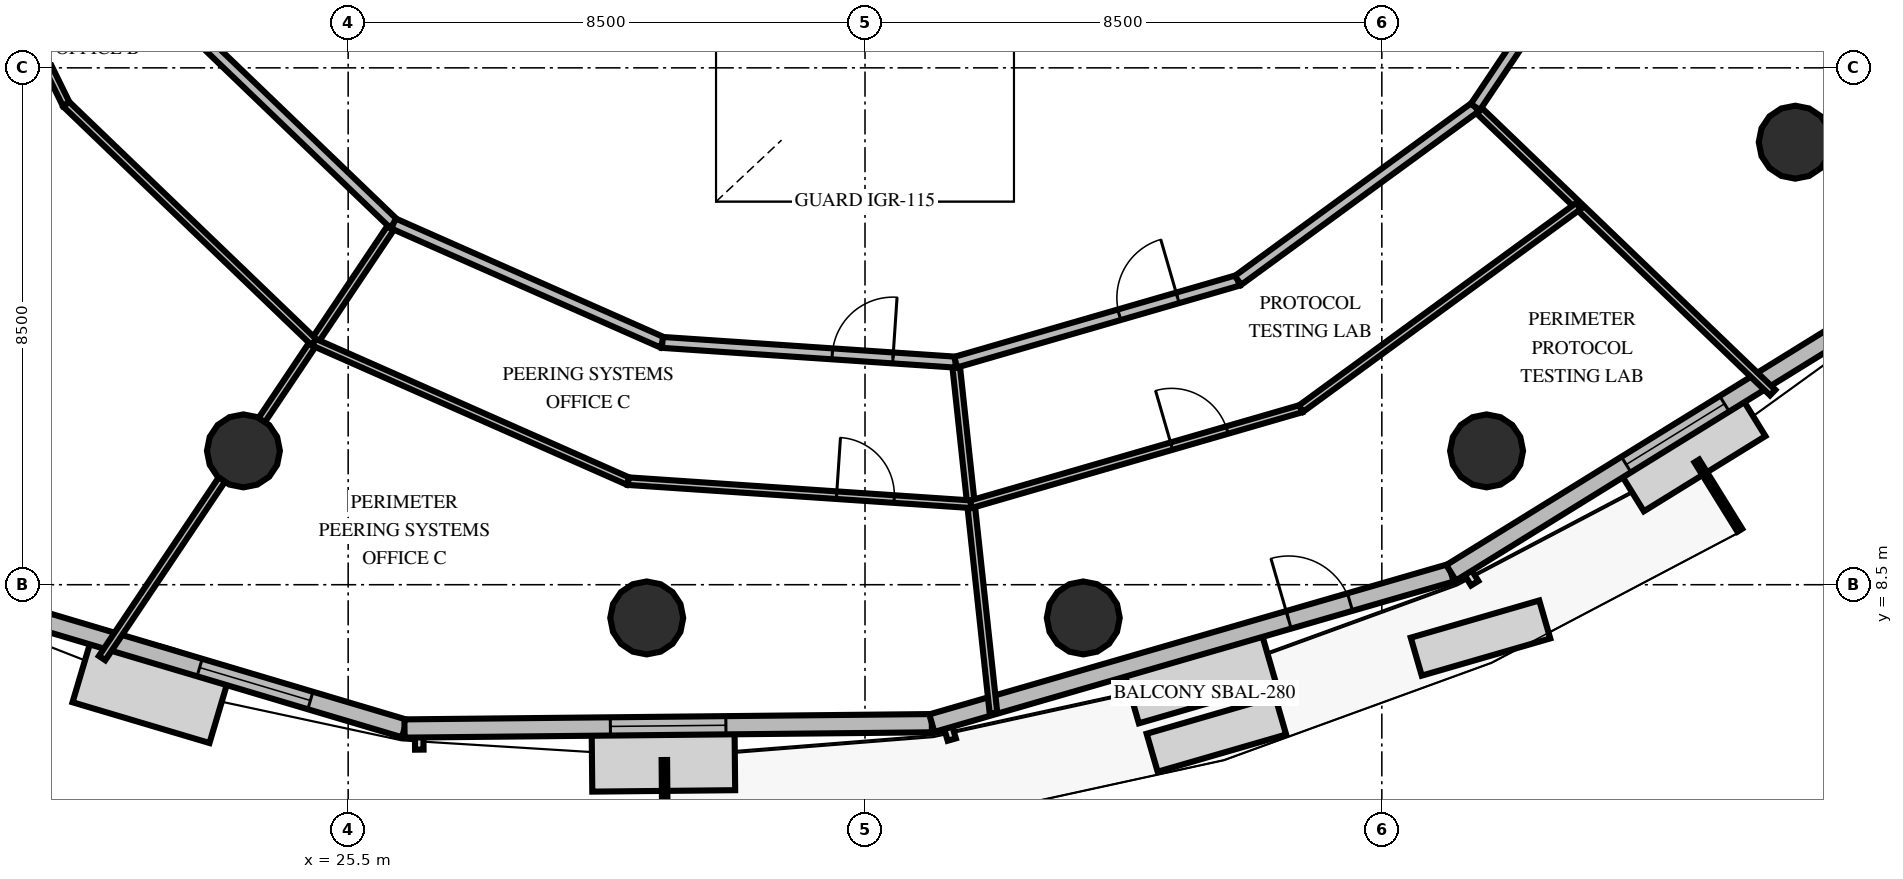
"""IFC4 building model, lengths in metres.
Left out: names, types, materials, properties, quantities, classifications, styles, units other than length and angle.
Written with IfcOpenShell. Run it as: python <this file> out.ifc"""

import sys

from ifc_helpers import new_model, si_unit, direction, frame, frame_2d, origin, origin_2d, place, context, subcontext, project, spatial, rectangle, circle, extrude, element, fill, save


model = new_model("IFC4")
c1 = context("Model", 3, precision=1e-05, world=origin(), true_north=direction((0.0, 1.0)))
c2 = subcontext(c1, "Body", "Model", "MODEL_VIEW")
j1 = project(units=[si_unit("LENGTHUNIT", "METRE"), si_unit("PLANEANGLEUNIT", "RADIAN")], contexts=[c1])
p1 = place(None, origin())
s1 = spatial("IfcSite", under=j1, at=p1, CompositionType="ELEMENT")
p2 = place(p1, origin())
s2 = spatial("IfcBuilding", under=s1, at=p2, CompositionType="ELEMENT")
p3 = place(p2, frame((0.0, 0.0, 101.8)))
s3 = spatial("IfcBuildingStorey", under=s2, at=p3, CompositionType="ELEMENT", Elevation=101.8)
for number, where, z_axis, x_axis in (
    (1, (23.778, 10.701, 0.0), (0.0, 0.0, 1.0), (1.0, 0.0, 0.0)),
    (2, (30.41, 7.954, 0.0), (0.0, 0.0, 1.0), (1.0, 0.0, 0.0)),
    (3, (37.59, 7.954, 0.0), (0.0, 0.0, 1.0), (1.0, 0.0, 0.0)),
    (4, (44.222, 10.701, 0.0), (0.0, 0.0, 1.0), (1.0, 0.0, 0.0)),
    (5, (49.299, 15.778, 0.0), (0.0, 0.0, 1.0), (1.0, 0.0, 0.0)),
):
    element("IfcColumn", number, at=place(p3, frame(where, z_axis=z_axis, x_axis=x_axis)), inside=s3, PredefinedType="COLUMN", context=c2, shape_type="SweptSolid", body=[
        extrude(circle(Radius=0.6, at=origin_2d()), origin(), (0.0, 0.0, 1.0), 4.0),
    ])
p4 = place(p3, frame((18.667, 8.444, 0.0), z_axis=(0.0, 0.0, 1.0), x_axis=(0.958482012245, -0.285152997885, 0.0)))
e6 = element("IfcWall", 6, at=p4, inside=s3, PredefinedType="SOLIDWALL", context=c2, shape_type="SweptSolid", body=[
    extrude(rectangle(XDim=8.095, YDim=0.3, at=frame_2d((4.048, 0.0))), origin(), (0.0, 0.0, 1.0), 2.9),
])
p5 = place(p4, frame((4.58, 0.0, 0.8)))
e7 = element("IfcOpeningElement", 7, at=p5, cuts=e6, PredefinedType="OPENING", context=c2, shape_type="SweptSolid", body=[
    extrude(rectangle(XDim=1.9, YDim=1.95, at=frame_2d((0.95, 0.975))), frame((0.0, 0.16, 0.0), z_axis=(0.0, -1.0, 0.0), x_axis=(1.0, 0.0, 0.0)), (0.0, 0.0, 1.0), 0.32),
])
p6 = place(p3, frame((26.427, 6.135, 0.0), z_axis=(0.0, 0.0, 1.0), x_axis=(0.999949221051, 0.010077465899, 0.0)))
e8 = element("IfcWall", 8, at=p6, inside=s3, PredefinedType="SOLIDWALL", context=c2, shape_type="SweptSolid", body=[
    extrude(rectangle(XDim=8.673, YDim=0.3, at=frame_2d((4.336, 0.0))), origin(), (0.0, 0.0, 1.0), 2.9),
])
p7 = place(p6, frame((3.386, 0.0, 0.8)))
e9 = element("IfcOpeningElement", 9, at=p7, cuts=e8, PredefinedType="OPENING", context=c2, shape_type="SweptSolid", body=[
    extrude(rectangle(XDim=1.9, YDim=1.95, at=frame_2d((0.95, 0.975))), frame((0.0, 0.16, 0.0), z_axis=(0.0, -1.0, 0.0), x_axis=(1.0, 0.0, 0.0)), (0.0, 0.0, 1.0), 0.32),
])
p8 = place(p3, frame((35.099, 6.223, 0.0), z_axis=(0.0, 0.0, 1.0), x_axis=(0.960531252737, 0.278172091547, 0.0)))
e10 = element("IfcWall", 10, at=p8, inside=s3, PredefinedType="SOLIDWALL", context=c2, shape_type="SweptSolid", body=[
    extrude(rectangle(XDim=8.891, YDim=0.3, at=frame_2d((4.445, 0.0))), origin(), (0.0, 0.0, 1.0), 2.9),
])
p9 = place(p8, frame((6.11, 0.0, 0.0)))
e11 = element("IfcOpeningElement", 11, at=p9, cuts=e10, PredefinedType="OPENING", context=c2, shape_type="SweptSolid", body=[
    extrude(rectangle(XDim=1.05, YDim=2.15, at=frame_2d((0.525, 1.075))), frame((0.0, 0.16, 0.0), z_axis=(0.0, -1.0, 0.0), x_axis=(1.0, 0.0, 0.0)), (0.0, 0.0, 1.0), 0.32),
])
p10 = place(p3, frame((43.639, 8.696, 0.0), z_axis=(0.0, 0.0, 1.0), x_axis=(0.850622495696, 0.5257769202, 0.0)))
e12 = element("IfcWall", 12, at=p10, inside=s3, PredefinedType="SOLIDWALL", context=c2, shape_type="SweptSolid", body=[
    extrude(rectangle(XDim=8.673, YDim=0.3, at=frame_2d((4.336, 0.0))), origin(), (0.0, 0.0, 1.0), 2.9),
])
p11 = place(p10, frame((3.386, 0.0, 0.8)))
e13 = element("IfcOpeningElement", 13, at=p11, cuts=e12, PredefinedType="OPENING", context=c2, shape_type="SweptSolid", body=[
    extrude(rectangle(XDim=1.9, YDim=1.95, at=frame_2d((0.95, 0.975))), frame((0.0, 0.16, 0.0), z_axis=(0.0, -1.0, 0.0), x_axis=(1.0, 0.0, 0.0)), (0.0, 0.0, 1.0), 0.32),
])
p12 = place(p3, frame((26.246, 14.439, 0.0), z_axis=(0.0, 0.0, 1.0), x_axis=(-0.557035457181, -0.830488711208, 0.0)))
e14 = element("IfcWall", 14, at=p12, inside=s3, PredefinedType="PARTITIONING", context=c2, shape_type="SweptSolid", body=[
    extrude(rectangle(XDim=8.605, YDim=0.125, at=frame_2d((4.302, 0.0))), origin(), (0.0, 0.0, 1.0), 2.8),
])
p13 = place(p3, frame((22.76, 17.789, 0.0), z_axis=(0.0, 0.0, 1.0), x_axis=(0.721155169052, -0.692773572063, 0.0)))
e15 = element("IfcWall", 15, at=p13, inside=s3, PredefinedType="PARTITIONING", context=c2, shape_type="SweptSolid", body=[
    extrude(rectangle(XDim=4.834, YDim=0.18, at=frame_2d((2.417, 0.0))), origin(), (0.0, 0.0, 1.0), 2.8),
])
p14 = place(p3, frame((18.372, 21.475, 0.0), z_axis=(0.0, 0.0, 1.0), x_axis=(0.440703575164, -0.897652693884, 0.0)))
e16 = element("IfcWall", 16, at=p14, inside=s3, PredefinedType="PARTITIONING", context=c2, shape_type="SweptSolid", body=[
    extrude(rectangle(XDim=5.651, YDim=0.125, at=frame_2d((2.825, 0.0))), origin(), (0.0, 0.0, 1.0), 2.8),
])
p15 = place(p14, frame((1.265, 0.0, 0.0)))
e17 = element("IfcOpeningElement", 17, at=p15, cuts=e16, PredefinedType="OPENING", context=c2, shape_type="SweptSolid", body=[
    extrude(rectangle(XDim=0.95, YDim=2.15, at=frame_2d((0.475, 1.075))), frame((0.0, 0.073, 0.0), z_axis=(0.0, -1.0, 0.0), x_axis=(1.0, 0.0, 0.0)), (0.0, 0.0, 1.0), 0.145),
])
p16 = place(p3, frame((20.862, 16.402, 0.0), z_axis=(0.0, 0.0, 1.0), x_axis=(0.721157614832, -0.692771026075, 0.0)))
e18 = element("IfcWall", 18, at=p16, inside=s3, PredefinedType="PARTITIONING", context=c2, shape_type="SweptSolid", body=[
    extrude(rectangle(XDim=5.651, YDim=0.125, at=frame_2d((2.825, 0.0))), origin(), (0.0, 0.0, 1.0), 2.8),
])
p17 = place(p3, frame((35.491, 12.16, 0.0), z_axis=(0.0, 0.0, 1.0), x_axis=(0.107148054284, -0.994243076145, 0.0)))
e19 = element("IfcWall", 19, at=p17, inside=s3, PredefinedType="PARTITIONING", context=c2, shape_type="SweptSolid", body=[
    extrude(rectangle(XDim=5.803, YDim=0.125, at=frame_2d((2.902, 0.0))), origin(), (0.0, 0.0, 1.0), 2.8),
])
p18 = place(p3, frame((26.246, 14.439, 0.0), z_axis=(0.0, 0.0, 1.0), x_axis=(0.914594968222, -0.404371171207, 0.0)))
e20 = element("IfcWall", 20, at=p18, inside=s3, PredefinedType="PARTITIONING", context=c2, shape_type="SweptSolid", body=[
    extrude(rectangle(XDim=4.834, YDim=0.18, at=frame_2d((2.417, 0.0))), origin(), (0.0, 0.0, 1.0), 2.8),
])
p19 = place(p3, frame((30.668, 12.485, 0.0), z_axis=(0.0, 0.0, 1.0), x_axis=(0.997745204479, -0.067115623665, 0.0)))
e21 = element("IfcWall", 21, at=p19, inside=s3, PredefinedType="PARTITIONING", context=c2, shape_type="SweptSolid", body=[
    extrude(rectangle(XDim=4.834, YDim=0.18, at=frame_2d((2.417, 0.0))), origin(), (0.0, 0.0, 1.0), 2.8),
])
p20 = place(p19, frame((2.801, 0.0, 0.0)))
e22 = element("IfcOpeningElement", 22, at=p20, cuts=e21, PredefinedType="OPENING", context=c2, shape_type="SweptSolid", body=[
    extrude(rectangle(XDim=1.0, YDim=2.15, at=frame_2d((0.5, 1.075))), frame((0.0, 0.1, 0.0), z_axis=(0.0, -1.0, 0.0), x_axis=(1.0, 0.0, 0.0)), (0.0, 0.0, 1.0), 0.2),
])
p21 = place(p3, frame((24.937, 12.488, 0.0), z_axis=(0.0, 0.0, 1.0), x_axis=(0.914595573512, -0.404369802178, 0.0)))
e23 = element("IfcWall", 23, at=p21, inside=s3, PredefinedType="PARTITIONING", context=c2, shape_type="SweptSolid", body=[
    extrude(rectangle(XDim=5.651, YDim=0.125, at=frame_2d((2.825, 0.0))), origin(), (0.0, 0.0, 1.0), 2.8),
])
p22 = place(p3, frame((30.105, 10.203, 0.0), z_axis=(0.0, 0.0, 1.0), x_axis=(0.997743284154, -0.067144165234, 0.0)))
e24 = element("IfcWall", 24, at=p22, inside=s3, PredefinedType="PARTITIONING", context=c2, shape_type="SweptSolid", body=[
    extrude(rectangle(XDim=5.65, YDim=0.125, at=frame_2d((2.825, 0.0))), origin(), (0.0, 0.0, 1.0), 2.8),
])
p23 = place(p22, frame((3.435, 0.0, 0.0)))
e25 = element("IfcOpeningElement", 25, at=p23, cuts=e24, PredefinedType="OPENING", context=c2, shape_type="SweptSolid", body=[
    extrude(rectangle(XDim=0.95, YDim=2.15, at=frame_2d((0.475, 1.075))), frame((0.0, 0.073, 0.0), z_axis=(0.0, -1.0, 0.0), x_axis=(1.0, 0.0, 0.0)), (0.0, 0.0, 1.0), 0.145),
])
p24 = place(p3, frame((44.039, 16.357, 0.0), z_axis=(0.0, 0.0, 1.0), x_axis=(0.721151976703, -0.692776895181, 0.0)))
e26 = element("IfcWall", 26, at=p24, inside=s3, PredefinedType="PARTITIONING", context=c2, shape_type="SweptSolid", body=[
    extrude(rectangle(XDim=6.78, YDim=0.125, at=frame_2d((3.39, 0.0))), origin(), (0.0, 0.0, 1.0), 2.8),
])
p25 = place(p3, frame((35.491, 12.16, 0.0), z_axis=(0.0, 0.0, 1.0), x_axis=(0.96053834934, 0.27814758573, 0.0)))
e27 = element("IfcWall", 27, at=p25, inside=s3, PredefinedType="PARTITIONING", context=c2, shape_type="SweptSolid", body=[
    extrude(rectangle(XDim=4.834, YDim=0.18, at=frame_2d((2.417, 0.0))), origin(), (0.0, 0.0, 1.0), 2.8),
])
p26 = place(p25, frame((2.801, 0.0, 0.0)))
e28 = element("IfcOpeningElement", 28, at=p26, cuts=e27, PredefinedType="OPENING", context=c2, shape_type="SweptSolid", body=[
    extrude(rectangle(XDim=1.0, YDim=2.15, at=frame_2d((0.5, 1.075))), frame((0.0, 0.1, 0.0), z_axis=(0.0, -1.0, 0.0), x_axis=(1.0, 0.0, 0.0)), (0.0, 0.0, 1.0), 0.2),
])
p27 = place(p3, frame((40.135, 13.505, 0.0), z_axis=(0.0, 0.0, 1.0), x_axis=(0.807469765086, 0.589908957782, 0.0)))
e29 = element("IfcWall", 29, at=p27, inside=s3, PredefinedType="PARTITIONING", context=c2, shape_type="SweptSolid", body=[
    extrude(rectangle(XDim=4.834, YDim=0.18, at=frame_2d((2.417, 0.0))), origin(), (0.0, 0.0, 1.0), 2.8),
])
p28 = place(p3, frame((35.743, 9.823, 0.0), z_axis=(0.0, 0.0, 1.0), x_axis=(0.960536321172, 0.278154589587, 0.0)))
e30 = element("IfcWall", 30, at=p28, inside=s3, PredefinedType="PARTITIONING", context=c2, shape_type="SweptSolid", body=[
    extrude(rectangle(XDim=5.651, YDim=0.125, at=frame_2d((2.825, 0.0))), origin(), (0.0, 0.0, 1.0), 2.8),
])
p29 = place(p28, frame((3.435, 0.0, 0.0)))
e31 = element("IfcOpeningElement", 31, at=p29, cuts=e30, PredefinedType="OPENING", context=c2, shape_type="SweptSolid", body=[
    extrude(rectangle(XDim=0.95, YDim=2.15, at=frame_2d((0.475, 1.075))), frame((0.0, 0.073, 0.0), z_axis=(0.0, -1.0, 0.0), x_axis=(1.0, 0.0, 0.0)), (0.0, 0.0, 1.0), 0.145),
])
p30 = place(p3, frame((41.171, 11.395, 0.0), z_axis=(0.0, 0.0, 1.0), x_axis=(0.807465531415, 0.589914752805, 0.0)))
e32 = element("IfcWall", 32, at=p30, inside=s3, PredefinedType="PARTITIONING", context=c2, shape_type="SweptSolid", body=[
    extrude(rectangle(XDim=5.65, YDim=0.125, at=frame_2d((2.825, 0.0))), origin(), (0.0, 0.0, 1.0), 2.8),
])
p31 = place(p3, frame((44.039, 16.357, 0.0), z_axis=(0.0, 0.0, 1.0), x_axis=(0.556994013801, 0.830516507114, 0.0)))
e33 = element("IfcWall", 33, at=p31, inside=s3, PredefinedType="PARTITIONING", context=c2, shape_type="SweptSolid", body=[
    extrude(rectangle(XDim=4.834, YDim=0.18, at=frame_2d((2.417, 0.0))), origin(), (0.0, 0.0, 1.0), 2.8),
])
p32 = place(p5, origin())
e34 = element("IfcWindow", 34, at=p32, inside=s3, PartitioningType="SINGLE_PANEL", PredefinedType="WINDOW", context=c2, shape_type="SweptSolid", body=[
    extrude(rectangle(XDim=1.9, YDim=1.95, at=frame_2d((0.95, 0.975))), frame((0.0, 0.03, 0.0), z_axis=(0.0, -1.0, 0.0), x_axis=(1.0, 0.0, 0.0)), (0.0, 0.0, 1.0), 0.06),
])
fill(e7, e34)
p33 = place(p7, origin())
e35 = element("IfcWindow", 35, at=p33, inside=s3, PartitioningType="SINGLE_PANEL", PredefinedType="WINDOW", context=c2, shape_type="SweptSolid", body=[
    extrude(rectangle(XDim=1.9, YDim=1.95, at=frame_2d((0.95, 0.975))), frame((0.0, 0.03, 0.0), z_axis=(0.0, -1.0, 0.0), x_axis=(1.0, 0.0, 0.0)), (0.0, 0.0, 1.0), 0.06),
])
fill(e9, e35)
p34 = place(p9, origin())
e36 = element("IfcDoor", 36, at=p34, inside=s3, OperationType="SINGLE_SWING_LEFT", PredefinedType="DOOR", context=c2, shape_type="SweptSolid", body=[
    extrude(rectangle(XDim=1.05, YDim=2.15, at=frame_2d((0.525, 1.075))), frame((0.0, 0.025, 0.0), z_axis=(0.0, -1.0, 0.0), x_axis=(1.0, 0.0, 0.0)), (0.0, 0.0, 1.0), 0.05),
])
fill(e11, e36)
p35 = place(p11, origin())
e37 = element("IfcWindow", 37, at=p35, inside=s3, PartitioningType="SINGLE_PANEL", PredefinedType="WINDOW", context=c2, shape_type="SweptSolid", body=[
    extrude(rectangle(XDim=1.9, YDim=1.95, at=frame_2d((0.95, 0.975))), frame((0.0, 0.03, 0.0), z_axis=(0.0, -1.0, 0.0), x_axis=(1.0, 0.0, 0.0)), (0.0, 0.0, 1.0), 0.06),
])
fill(e13, e37)
p36 = place(p20, origin())
e38 = element("IfcDoor", 38, at=p36, inside=s3, OperationType="SINGLE_SWING_RIGHT", PredefinedType="DOOR", context=c2, shape_type="SweptSolid", body=[
    extrude(rectangle(XDim=1.0, YDim=2.15, at=frame_2d((0.5, 1.075))), frame((0.0, 0.025, 0.0), z_axis=(0.0, -1.0, 0.0), x_axis=(1.0, 0.0, 0.0)), (0.0, 0.0, 1.0), 0.05),
])
fill(e22, e38)
p37 = place(p23, origin())
e39 = element("IfcDoor", 39, at=p37, inside=s3, OperationType="SINGLE_SWING_LEFT", PredefinedType="DOOR", context=c2, shape_type="SweptSolid", body=[
    extrude(rectangle(XDim=0.95, YDim=2.15, at=frame_2d((0.475, 1.075))), frame((0.0, 0.025, 0.0), z_axis=(0.0, -1.0, 0.0), x_axis=(1.0, 0.0, 0.0)), (0.0, 0.0, 1.0), 0.05),
])
fill(e25, e39)
p38 = place(p26, origin())
e40 = element("IfcDoor", 40, at=p38, inside=s3, OperationType="SINGLE_SWING_RIGHT", PredefinedType="DOOR", context=c2, shape_type="SweptSolid", body=[
    extrude(rectangle(XDim=1.0, YDim=2.15, at=frame_2d((0.5, 1.075))), frame((0.0, 0.025, 0.0), z_axis=(0.0, -1.0, 0.0), x_axis=(1.0, 0.0, 0.0)), (0.0, 0.0, 1.0), 0.05),
])
fill(e28, e40)
p39 = place(p29, origin())
e41 = element("IfcDoor", 41, at=p39, inside=s3, OperationType="SINGLE_SWING_LEFT", PredefinedType="DOOR", context=c2, shape_type="SweptSolid", body=[
    extrude(rectangle(XDim=0.95, YDim=2.15, at=frame_2d((0.475, 1.075))), frame((0.0, 0.025, 0.0), z_axis=(0.0, -1.0, 0.0), x_axis=(1.0, 0.0, 0.0)), (0.0, 0.0, 1.0), 0.05),
])
fill(e31, e41)
save(model, sys.argv[1])
